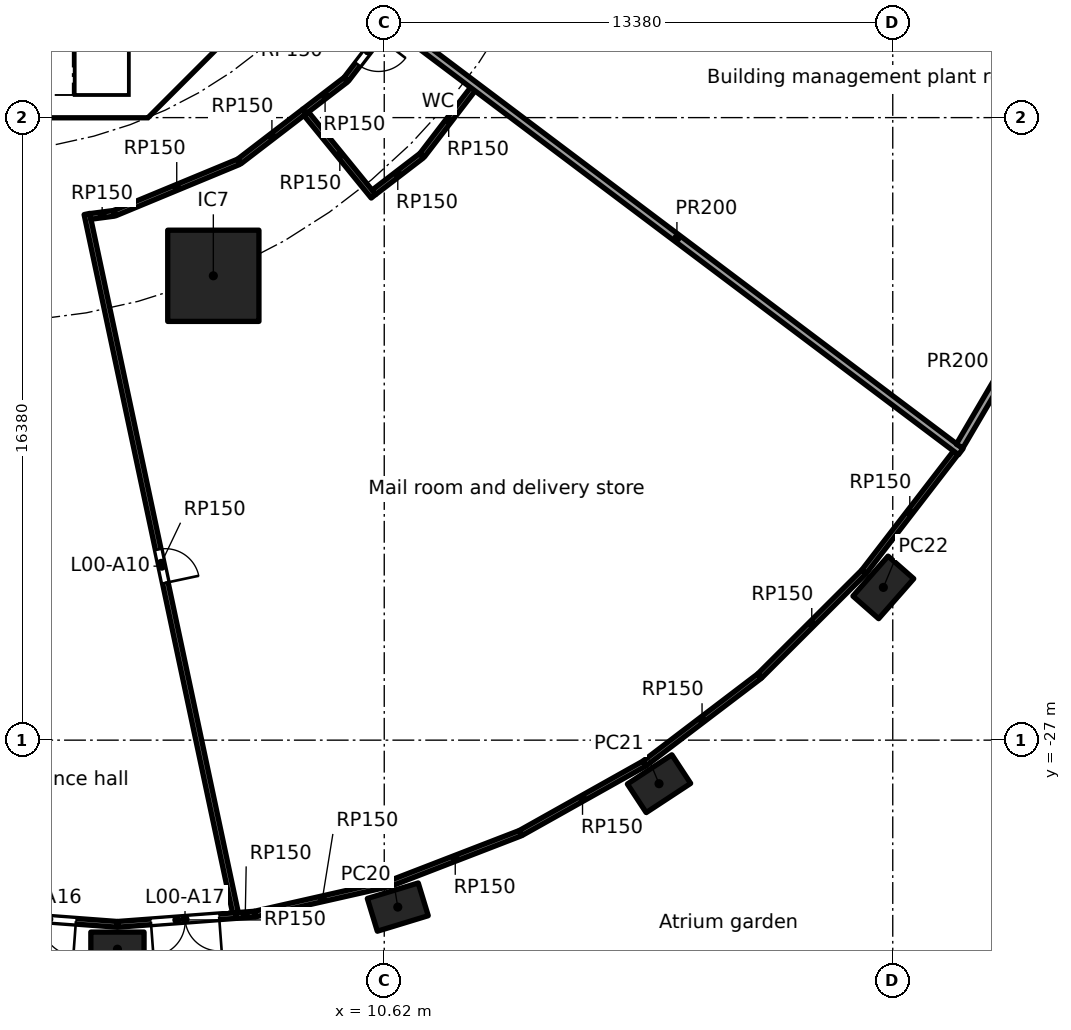
"""IFC4 building model, lengths in metres.
Left out: names, types, materials, properties, quantities, classifications, styles, units other than length and angle.
Written with IfcOpenShell. Run it as: python <this file> out.ifc"""

import sys

from ifc_helpers import new_model, si_unit, direction, frame, frame_2d, origin, origin_2d, place, context, subcontext, project, spatial, polyline, rectangle, hollow_rectangle, outline, extrude, element, fill, save


model = new_model("IFC4")
c1 = context("Model", 3, precision=1e-05, world=origin(), true_north=direction((0.0, 1.0)))
c2 = subcontext(c1, "Body", "Model", "MODEL_VIEW")
j1 = project(units=[si_unit("LENGTHUNIT", "METRE"), si_unit("PLANEANGLEUNIT", "RADIAN")], contexts=[c1])
p1 = place(None, origin())
s1 = spatial("IfcSite", under=j1, at=p1, CompositionType="ELEMENT")
p2 = place(p1, origin())
s2 = spatial("IfcBuilding", under=s1, at=p2, CompositionType="ELEMENT")
p3 = place(p2, origin())
s3 = spatial("IfcBuildingStorey", under=s2, at=p3, CompositionType="ELEMENT", Elevation=0.0)
for number, where, z_axis, x_axis in (
    (1, (3.6, -32.5, 0.0), (0.0, 0.0, 1.0), (1.0, 0.0, 0.0)),
    (2, (10.976, -31.393, 0.0), (0.0, 0.0, 1.0), (0.957, 0.292, 0.0)),
    (3, (17.85, -28.146, 0.0), (0.0, 0.0, 1.0), (0.836, 0.549, 0.0)),
    (4, (23.752, -22.981, 0.0), (0.0, 0.0, 1.0), (0.66, 0.751, 0.0)),
):
    element("IfcColumn", number, at=place(p3, frame(where, z_axis=z_axis, x_axis=x_axis)), inside=s3, PredefinedType="COLUMN", context=c2, shape_type="SweptSolid", body=[
        extrude(hollow_rectangle(XDim=1.4, YDim=0.9, WallThickness=0.05, at=origin_2d()), origin(), (0.0, 0.0, 1.0), 7.0),
    ])
p4 = place(p3, frame((6.123, -14.782, 0.0), z_axis=(0.0, 0.0, 1.0), x_axis=(1.0, 0.0, 0.0)))
e5 = element("IfcColumn", 5, at=p4, inside=s3, PredefinedType="COLUMN", context=c2, shape_type="SweptSolid", body=[
    extrude(rectangle(XDim=2.4, YDim=2.4, at=origin_2d()), origin(), (0.0, 0.0, 1.0), 7.0),
])
p5 = place(p3, frame((27.934, -32.055, 0.0), z_axis=(0.0, 0.0, 1.0), x_axis=(-0.790821490188, -0.612046869656, 0.0)))
e6 = element("IfcWall", 6, at=p5, inside=s3, PredefinedType="SOLIDWALL", context=c2, shape_type="SweptSolid", body=[
    extrude(rectangle(XDim=6.861, YDim=0.3, at=frame_2d((3.43, 0.0))), origin(), (0.0, 0.0, 1.0), 7.0),
])
p6 = place(p5, frame((2.43, 0.0, 0.0)))
e7 = element("IfcOpeningElement", 7, at=p6, cuts=e6, PredefinedType="OPENING", context=c2, shape_type="SweptSolid", body=[
    extrude(rectangle(XDim=2.0, YDim=2.4, at=frame_2d((1.0, 1.2))), frame((0.0, 0.16, 0.0), z_axis=(0.0, -1.0, 0.0), x_axis=(1.0, 0.0, 0.0)), (0.0, 0.0, 1.0), 0.32),
])
p7 = place(p3, frame((-3.801, -10.325, 0.0), z_axis=(0.0, 0.0, 1.0), x_axis=(1.0, 0.0, 0.0)))
e8 = element("IfcWall", 8, at=p7, inside=s3, PredefinedType="SHEAR", context=c2, shape_type="SweptSolid", body=[
    extrude(rectangle(XDim=7.602, YDim=0.6, at=frame_2d((3.801, 0.0))), origin(), (0.0, 0.0, 1.0), 6.7),
])
p8 = place(p7, frame((6.351, 0.0, 0.0)))
e9 = element("IfcOpeningElement", 9, at=p8, cuts=e8, PredefinedType="OPENING", context=c2, shape_type="SweptSolid", body=[
    extrude(rectangle(XDim=1.1, YDim=2.1, at=frame_2d((0.55, 1.05))), frame((0.0, 0.31, 0.0), z_axis=(0.0, -1.0, 0.0), x_axis=(1.0, 0.0, 0.0)), (0.0, 0.0, 1.0), 0.62),
])
p9 = place(p3, frame((4.613, -9.988, 0.0), z_axis=(0.0, 0.0, 1.0), x_axis=(0.707106781187, 0.707106781187, 0.0)))
e10 = element("IfcWall", 10, at=p9, inside=s3, PredefinedType="SHEAR", context=c2, shape_type="SweptSolid", body=[
    extrude(rectangle(XDim=7.602, YDim=0.6, at=frame_2d((3.801, 0.0))), origin(), (0.0, 0.0, 1.0), 6.7),
])
p10 = place(p9, frame((3.201, 0.0, 0.0)))
e11 = element("IfcOpeningElement", 11, at=p10, cuts=e10, PredefinedType="OPENING", context=c2, shape_type="SweptSolid", body=[
    extrude(rectangle(XDim=1.2, YDim=2.1, at=frame_2d((0.6, 1.05))), frame((0.0, 0.31, 0.0), z_axis=(0.0, -1.0, 0.0), x_axis=(1.0, 0.0, 0.0)), (0.0, 0.0, 1.0), 0.62),
])
p11 = place(p3, frame((4.0, -10.025, 0.0), z_axis=(0.0, 0.0, 1.0), x_axis=(0.0, 1.0, 0.0)))
e12 = element("IfcWall", 12, at=p11, inside=s3, PredefinedType="SOLIDWALL", context=c2, shape_type="SweptSolid", body=[
    extrude(rectangle(XDim=3.0, YDim=0.2, at=frame_2d((1.5, 0.0))), origin(), (0.0, 0.0, 1.0), 6.7),
])
p12 = place(p11, frame((0.975, 0.0, 0.0)))
e13 = element("IfcOpeningElement", 13, at=p12, cuts=e12, PredefinedType="OPENING", context=c2, shape_type="SweptSolid", body=[
    extrude(rectangle(XDim=1.1, YDim=2.1, at=frame_2d((0.55, 1.05))), frame((0.0, 0.11, 0.0), z_axis=(0.0, -1.0, 0.0), x_axis=(1.0, 0.0, 0.0)), (0.0, 0.0, 1.0), 0.22),
])
p13 = place(p3, origin())
e14 = element("IfcWall", 14, at=p13, inside=s3, PredefinedType="SHEAR", context=c2, shape_type="SweptSolid", body=[
    extrude(outline(polyline([(3.801, -10.625), (3.801, -10.025), (4.152, -10.025), (4.401, -9.776), (4.825, -10.2), (4.401, -10.625), (3.801, -10.625)])), origin(), (0.0, 0.0, 1.0), 6.7),
])
p14 = place(p3, frame((2.796, -13.156, 0.0), z_axis=(0.0, 0.0, 1.0), x_axis=(0.207917792027, -0.978146303862, 0.0)))
e15 = element("IfcWall", 15, at=p14, inside=s3, PredefinedType="PARTITIONING", context=c2, shape_type="SweptSolid", body=[
    extrude(rectangle(XDim=18.794, YDim=0.15, at=frame_2d((9.397, 0.0))), origin(), (0.0, 0.0, 1.0), 6.7),
])
p15 = place(p14, frame((9.023, 0.0, 0.0)))
e16 = element("IfcOpeningElement", 16, at=p15, cuts=e15, PredefinedType="OPENING", context=c2, shape_type="SweptSolid", body=[
    extrude(rectangle(XDim=0.9, YDim=2.1, at=frame_2d((0.45, 1.05))), frame((0.0, 0.085, 0.0), z_axis=(0.0, -1.0, 0.0), x_axis=(1.0, 0.0, 0.0)), (0.0, 0.0, 1.0), 0.17),
])
p16 = place(p3, frame((3.508, -13.138, 0.0), z_axis=(0.0, 0.0, 1.0), x_axis=(-0.991447664465, -0.130504898859, 0.0)))
e17 = element("IfcWall", 17, at=p16, inside=s3, PredefinedType="PARTITIONING", context=c2, shape_type="SweptSolid", body=[
    extrude(rectangle(XDim=0.627, YDim=0.15, at=frame_2d((0.313, 0.0))), origin(), (0.0, 0.0, 1.0), 6.7),
])
p17 = place(p3, frame((3.593, -31.846, 0.0), z_axis=(0.0, 0.0, 1.0), x_axis=(-0.997233506708, 0.074332584365, 0.0)))
e18 = element("IfcWall", 18, at=p17, inside=s3, PredefinedType="PARTITIONING", context=c2, shape_type="SweptSolid", body=[
    extrude(rectangle(XDim=3.61, YDim=0.15, at=frame_2d((1.805, 0.0))), origin(), (0.0, 0.0, 1.0), 6.7),
])
p18 = place(p17, frame((1.088, 0.0, 0.0)))
e19 = element("IfcOpeningElement", 19, at=p18, cuts=e18, PredefinedType="OPENING", context=c2, shape_type="SweptSolid", body=[
    extrude(rectangle(XDim=1.8, YDim=2.1, at=frame_2d((0.9, 1.05))), frame((0.0, 0.085, 0.0), z_axis=(0.0, -1.0, 0.0), x_axis=(1.0, 0.0, 0.0)), (0.0, 0.0, 1.0), 0.17),
])
p19 = place(p3, frame((6.72, -31.614, 0.0), z_axis=(0.0, 0.0, 1.0), x_axis=(-0.997228552186, -0.074399023545, 0.0)))
e20 = element("IfcWall", 20, at=p19, inside=s3, PredefinedType="PARTITIONING", context=c2, shape_type="SweptSolid", body=[
    extrude(rectangle(XDim=3.121, YDim=0.15, at=frame_2d((1.56, 0.0))), origin(), (0.0, 0.0, 1.0), 6.7),
])
p20 = place(p19, frame((0.446, 0.0, 0.0)))
e21 = element("IfcOpeningElement", 21, at=p20, cuts=e20, PredefinedType="OPENING", context=c2, shape_type="SweptSolid", body=[
    extrude(rectangle(XDim=1.8, YDim=2.1, at=frame_2d((0.9, 1.05))), frame((0.0, 0.085, 0.0), z_axis=(0.0, -1.0, 0.0), x_axis=(1.0, 0.0, 0.0)), (0.0, 0.0, 1.0), 0.17),
])
p21 = place(p3, frame((6.789, -11.782, 0.0), z_axis=(0.0, 0.0, 1.0), x_axis=(-0.923881838111, -0.382677866108, 0.0)))
e22 = element("IfcWall", 22, at=p21, inside=s3, PredefinedType="PARTITIONING", context=c2, shape_type="SweptSolid", body=[
    extrude(rectangle(XDim=3.527, YDim=0.15, at=frame_2d((1.763, 0.0))), origin(), (0.0, 0.0, 1.0), 6.7),
])
p22 = place(p3, frame((7.207, -31.578, 0.0), z_axis=(0.0, 0.0, 1.0), x_axis=(-0.997262298747, -0.073945300709, 0.0)))
e23 = element("IfcWall", 23, at=p22, inside=s3, PredefinedType="PARTITIONING", context=c2, shape_type="SweptSolid", body=[
    extrude(rectangle(XDim=0.489, YDim=0.15, at=frame_2d((0.244, 0.0))), origin(), (0.0, 0.0, 1.0), 6.7),
])
p23 = place(p3, frame((8.519, -10.459, 0.0), z_axis=(0.0, 0.0, 1.0), x_axis=(-0.793372937326, -0.608735888805, 0.0)))
e24 = element("IfcWall", 24, at=p23, inside=s3, PredefinedType="PARTITIONING", context=c2, shape_type="SweptSolid", body=[
    extrude(rectangle(XDim=2.155, YDim=0.15, at=frame_2d((1.078, 0.0))), origin(), (0.0, 0.0, 1.0), 6.7),
])
p24 = place(p3, frame((9.607, -9.624, 0.0), z_axis=(0.0, 0.0, 1.0), x_axis=(-0.793371316762, -0.6087380009, 0.0)))
e25 = element("IfcWall", 25, at=p24, inside=s3, PredefinedType="PARTITIONING", context=c2, shape_type="SweptSolid", body=[
    extrude(rectangle(XDim=1.371, YDim=0.15, at=frame_2d((0.686, 0.0))), origin(), (0.0, 0.0, 1.0), 6.7),
])
p25 = place(p3, frame((10.336, -12.689, 0.0), z_axis=(0.0, 0.0, 1.0), x_axis=(-0.631537140908, 0.775345625934, 0.0)))
e26 = element("IfcWall", 26, at=p25, inside=s3, PredefinedType="PARTITIONING", context=c2, shape_type="SweptSolid", body=[
    extrude(rectangle(XDim=2.801, YDim=0.15, at=frame_2d((1.401, 0.0))), origin(), (0.0, 0.0, 1.0), 6.7),
])
p26 = place(p3, frame((10.762, -30.774, 0.0), z_axis=(0.0, 0.0, 1.0), x_axis=(-0.975334612021, -0.220731498873, 0.0)))
e27 = element("IfcWall", 27, at=p26, inside=s3, PredefinedType="PARTITIONING", context=c2, shape_type="SweptSolid", body=[
    extrude(rectangle(XDim=3.63, YDim=0.15, at=frame_2d((1.815, 0.0))), origin(), (0.0, 0.0, 1.0), 6.7),
])
p27 = place(p3, frame((10.774, -8.109, 0.0), z_axis=(0.0, 0.0, 1.0), x_axis=(-0.608754453805, -0.793358692504, 0.0)))
e28 = element("IfcWall", 28, at=p27, inside=s3, PredefinedType="PARTITIONING", context=c2, shape_type="SweptSolid", body=[
    extrude(rectangle(XDim=1.888, YDim=0.15, at=frame_2d((0.944, 0.0))), origin(), (0.0, 0.0, 1.0), 6.7),
])
p28 = place(p27, frame((0.5, 0.0, 0.0)))
e29 = element("IfcOpeningElement", 29, at=p28, cuts=e28, PredefinedType="OPENING", context=c2, shape_type="SweptSolid", body=[
    extrude(rectangle(XDim=0.9, YDim=2.1, at=frame_2d((0.45, 1.05))), frame((0.0, 0.085, 0.0), z_axis=(0.0, -1.0, 0.0), x_axis=(1.0, 0.0, 0.0)), (0.0, 0.0, 1.0), 0.17),
])
p29 = place(p3, frame((11.604, -11.621, 0.0), z_axis=(0.0, 0.0, 1.0), x_axis=(-0.793385500572, -0.608719514622, 0.0)))
e30 = element("IfcWall", 30, at=p29, inside=s3, PredefinedType="PARTITIONING", context=c2, shape_type="SweptSolid", body=[
    extrude(rectangle(XDim=1.584, YDim=0.15, at=frame_2d((0.792, 0.0))), origin(), (0.0, 0.0, 1.0), 6.7),
])
p30 = place(p3, frame((13.011, -9.793, 0.0), z_axis=(0.0, 0.0, 1.0), x_axis=(-0.60872331989, -0.793382580992, 0.0)))
e31 = element("IfcWall", 31, at=p30, inside=s3, PredefinedType="PARTITIONING", context=c2, shape_type="SweptSolid", body=[
    extrude(rectangle(XDim=2.283, YDim=0.15, at=frame_2d((1.142, 0.0))), origin(), (0.0, 0.0, 1.0), 6.7),
])
p31 = place(p3, frame((14.2, -29.448, 0.0), z_axis=(0.0, 0.0, 1.0), x_axis=(-0.932825072941, -0.360329548181, 0.0)))
e32 = element("IfcWall", 32, at=p31, inside=s3, PredefinedType="PARTITIONING", context=c2, shape_type="SweptSolid", body=[
    extrude(rectangle(XDim=3.67, YDim=0.15, at=frame_2d((1.835, 0.0))), origin(), (0.0, 0.0, 1.0), 6.7),
])
p32 = place(p3, frame((17.461, -27.619, 0.0), z_axis=(0.0, 0.0, 1.0), x_axis=(-0.872065260979, -0.489389600005, 0.0)))
e33 = element("IfcWall", 33, at=p32, inside=s3, PredefinedType="PARTITIONING", context=c2, shape_type="SweptSolid", body=[
    extrude(rectangle(XDim=3.725, YDim=0.15, at=frame_2d((1.862, 0.0))), origin(), (0.0, 0.0, 1.0), 6.7),
])
p33 = place(p3, frame((20.491, -25.316, 0.0), z_axis=(0.0, 0.0, 1.0), x_axis=(-0.796018224109, -0.605272654996, 0.0)))
e34 = element("IfcWall", 34, at=p33, inside=s3, PredefinedType="PARTITIONING", context=c2, shape_type="SweptSolid", body=[
    extrude(rectangle(XDim=3.791, YDim=0.15, at=frame_2d((1.896, 0.0))), origin(), (0.0, 0.0, 1.0), 6.7),
])
p34 = place(p3, frame((23.236, -22.578, 0.0), z_axis=(0.0, 0.0, 1.0), x_axis=(-0.707801601764, -0.706411277189, 0.0)))
e35 = element("IfcWall", 35, at=p34, inside=s3, PredefinedType="PARTITIONING", context=c2, shape_type="SweptSolid", body=[
    extrude(rectangle(XDim=3.863, YDim=0.15, at=frame_2d((1.932, 0.0))), origin(), (0.0, 0.0, 1.0), 6.7),
])
p35 = place(p3, frame((25.652, -19.444, 0.0), z_axis=(0.0, 0.0, 1.0), x_axis=(-0.610389727001, -0.792101244269, 0.0)))
e36 = element("IfcWall", 36, at=p35, inside=s3, PredefinedType="PARTITIONING", context=c2, shape_type="SweptSolid", body=[
    extrude(rectangle(XDim=3.943, YDim=0.15, at=frame_2d((1.972, 0.0))), origin(), (0.0, 0.0, 1.0), 6.7),
])
p36 = place(p3, frame((25.788, -19.41, 0.0), z_axis=(0.0, 0.0, 1.0), x_axis=(-0.798975382821, 0.601363731568, 0.0)))
e37 = element("IfcWall", 37, at=p36, inside=s3, PredefinedType="PARTITIONING", context=c2, shape_type="SweptSolid", body=[
    extrude(rectangle(XDim=18.692, YDim=0.2, at=frame_2d((9.346, 0.0))), origin(), (0.0, 0.0, 1.0), 6.7),
])
p37 = place(p3, frame((27.683, -15.985, 0.0), z_axis=(0.0, 0.0, 1.0), x_axis=(-0.506329356613, -0.862340178022, 0.0)))
e38 = element("IfcWall", 38, at=p37, inside=s3, PredefinedType="PARTITIONING", context=c2, shape_type="SweptSolid", body=[
    extrude(rectangle(XDim=3.801, YDim=0.2, at=frame_2d((1.9, 0.0))), origin(), (0.0, 0.0, 1.0), 6.7),
])
p38 = place(p12, origin())
e39 = element("IfcDoor", 39, at=p38, inside=s3, OperationType="SINGLE_SWING_RIGHT", PredefinedType="DOOR", context=c2, shape_type="SweptSolid", body=[
    extrude(rectangle(XDim=1.1, YDim=2.1, at=frame_2d((0.55, 1.05))), frame((0.0, 0.025, 0.0), z_axis=(0.0, -1.0, 0.0), x_axis=(1.0, 0.0, 0.0)), (0.0, 0.0, 1.0), 0.05),
])
fill(e13, e39)
p39 = place(p8, frame((1.1, 0.0, 0.0), x_axis=(-1.0, 0.0, 0.0)))
e40 = element("IfcDoor", 40, at=p39, inside=s3, OperationType="SINGLE_SWING_RIGHT", PredefinedType="DOOR", context=c2, shape_type="SweptSolid", body=[
    extrude(rectangle(XDim=1.1, YDim=2.1, at=frame_2d((0.55, 1.05))), frame((0.0, 0.025, 0.0), z_axis=(0.0, -1.0, 0.0), x_axis=(1.0, 0.0, 0.0)), (0.0, 0.0, 1.0), 0.05),
])
fill(e9, e40)
p40 = place(p28, origin())
e41 = element("IfcDoor", 41, at=p40, inside=s3, OperationType="SINGLE_SWING_LEFT", PredefinedType="DOOR", context=c2, shape_type="SweptSolid", body=[
    extrude(rectangle(XDim=0.9, YDim=2.1, at=frame_2d((0.45, 1.05))), frame((0.0, 0.025, 0.0), z_axis=(0.0, -1.0, 0.0), x_axis=(1.0, 0.0, 0.0)), (0.0, 0.0, 1.0), 0.05),
])
fill(e29, e41)
p41 = place(p15, origin())
e42 = element("IfcDoor", 42, at=p41, inside=s3, OperationType="SINGLE_SWING_RIGHT", PredefinedType="DOOR", context=c2, shape_type="SweptSolid", body=[
    extrude(rectangle(XDim=0.9, YDim=2.1, at=frame_2d((0.45, 1.05))), frame((0.0, 0.025, 0.0), z_axis=(0.0, -1.0, 0.0), x_axis=(1.0, 0.0, 0.0)), (0.0, 0.0, 1.0), 0.05),
])
fill(e16, e42)
p42 = place(p18, origin())
e43 = element("IfcDoor", 43, at=p42, inside=s3, OperationType="DOUBLE_DOOR_SINGLE_SWING", PredefinedType="DOOR", context=c2, shape_type="SweptSolid", body=[
    extrude(rectangle(XDim=1.8, YDim=2.1, at=frame_2d((0.9, 1.05))), frame((0.0, 0.025, 0.0), z_axis=(0.0, -1.0, 0.0), x_axis=(1.0, 0.0, 0.0)), (0.0, 0.0, 1.0), 0.05),
])
fill(e19, e43)
p43 = place(p20, origin())
e44 = element("IfcDoor", 44, at=p43, inside=s3, OperationType="DOUBLE_DOOR_SINGLE_SWING", PredefinedType="DOOR", context=c2, shape_type="SweptSolid", body=[
    extrude(rectangle(XDim=1.8, YDim=2.1, at=frame_2d((0.9, 1.05))), frame((0.0, 0.025, 0.0), z_axis=(0.0, -1.0, 0.0), x_axis=(1.0, 0.0, 0.0)), (0.0, 0.0, 1.0), 0.05),
])
fill(e21, e44)
save(model, sys.argv[1])
